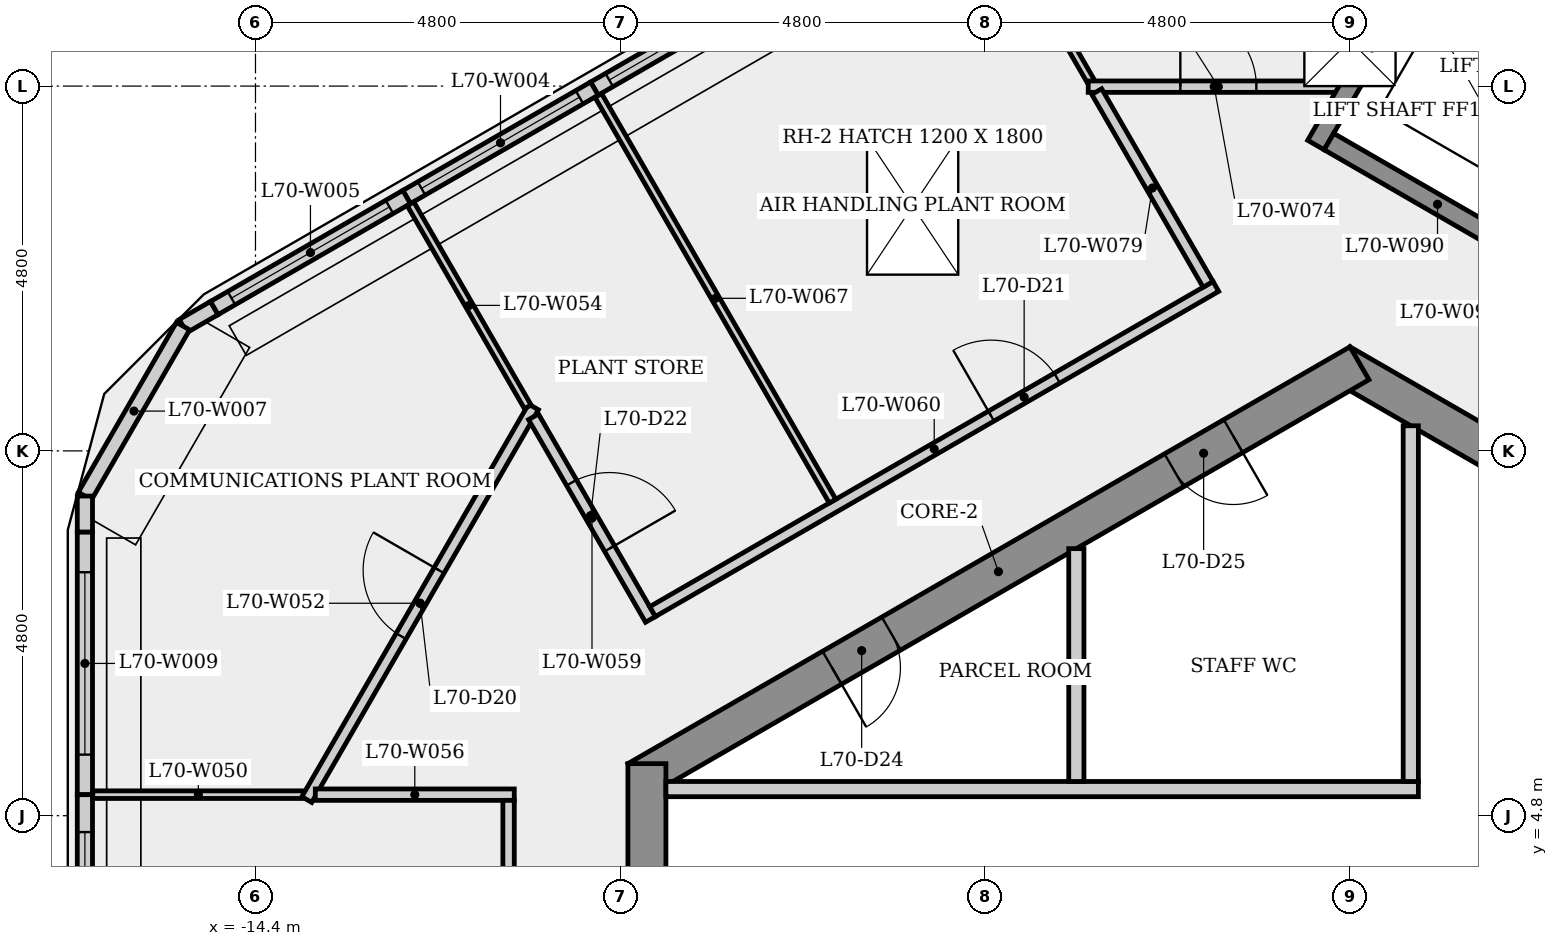
"""IFC4 building model, lengths in metres.
Left out: names, types, materials, properties, quantities, classifications, styles, units other than length and angle.
Written with IfcOpenShell. Run it as: python <this file> out.ifc"""

import sys

from ifc_helpers import new_model, si_unit, direction, frame, frame_2d, origin, origin_2d, place, context, subcontext, project, spatial, rectangle, extrude, element, fill, save


model = new_model("IFC4")
c1 = context("Model", 3, precision=1e-05, world=origin(), true_north=direction((0.0, 1.0)))
c2 = subcontext(c1, "Body", "Model", "MODEL_VIEW")
j1 = project(units=[si_unit("LENGTHUNIT", "METRE"), si_unit("PLANEANGLEUNIT", "RADIAN")], contexts=[c1])
p1 = place(None, origin())
s1 = spatial("IfcSite", under=j1, at=p1, CompositionType="ELEMENT")
p2 = place(p1, origin())
s2 = spatial("IfcBuilding", under=s1, at=p2, CompositionType="ELEMENT")
p3 = place(p2, frame((0.0, 0.0, 262.9)))
s3 = spatial("IfcBuildingStorey", under=s2, at=p3, CompositionType="ELEMENT", Elevation=262.9)
p4 = place(p3, frame((9.375, 5.268, 0.0), z_axis=(0.0, 0.0, 1.0), x_axis=(-0.866023993627, 0.500002442456, 0.0)))
e1 = element("IfcWall", 1, at=p4, inside=s3, PredefinedType="SHEAR", context=c2, shape_type="SweptSolid", body=[
    extrude(rectangle(XDim=10.97, YDim=0.5, at=frame_2d((5.485, 0.0))), origin(), (0.0, 0.0, 1.0), 4.8),
])
p5 = place(p4, frame((4.55, 0.0, 0.0)))
e2 = element("IfcOpeningElement", 2, at=p5, cuts=e1, PredefinedType="OPENING", context=c2, shape_type="SweptSolid", body=[
    extrude(rectangle(XDim=0.9, YDim=2.1, at=frame_2d((0.45, 1.05))), frame((0.0, 0.26, 0.0), z_axis=(0.0, -1.0, 0.0), x_axis=(1.0, 0.0, 0.0)), (0.0, 0.0, 1.0), 0.52),
])
p6 = place(p3, frame((0.125, 10.753, 0.0), z_axis=(0.0, 0.0, 1.0), x_axis=(-0.866023993627, -0.500002442456, 0.0)))
e3 = element("IfcWall", 3, at=p6, inside=s3, PredefinedType="SHEAR", context=c2, shape_type="SweptSolid", body=[
    extrude(rectangle(XDim=10.97, YDim=0.5, at=frame_2d((5.485, 0.0))), origin(), (0.0, 0.0, 1.0), 4.8),
])
p7 = place(p6, frame((7.113, 0.0, 0.0)))
e4 = element("IfcOpeningElement", 4, at=p7, cuts=e3, PredefinedType="OPENING", context=c2, shape_type="SweptSolid", body=[
    extrude(rectangle(XDim=0.9, YDim=2.1, at=frame_2d((0.45, 1.05))), frame((0.0, 0.26, 0.0), z_axis=(0.0, -1.0, 0.0), x_axis=(1.0, 0.0, 0.0)), (0.0, 0.0, 1.0), 0.52),
])
p8 = place(p6, frame((1.918, 0.0, 0.0)))
e5 = element("IfcOpeningElement", 5, at=p8, cuts=e3, PredefinedType="OPENING", context=c2, shape_type="SweptSolid", body=[
    extrude(rectangle(XDim=0.9, YDim=2.1, at=frame_2d((0.45, 1.05))), frame((0.0, 0.26, 0.0), z_axis=(0.0, -1.0, 0.0), x_axis=(1.0, 0.0, 0.0)), (0.0, 0.0, 1.0), 0.52),
])
p9 = place(p3, frame((-9.25, 5.485, 0.0), z_axis=(0.0, 0.0, 1.0), x_axis=(0.0, -1.0, 0.0)))
e6 = element("IfcWall", 6, at=p9, inside=s3, PredefinedType="SHEAR", context=c2, shape_type="SweptSolid", body=[
    extrude(rectangle(XDim=10.97, YDim=0.5, at=frame_2d((5.485, 0.0))), origin(), (0.0, 0.0, 1.0), 4.8),
])
p10 = place(p9, frame((8.509, 0.0, 0.0)))
e7 = element("IfcOpeningElement", 7, at=p10, cuts=e6, PredefinedType="OPENING", context=c2, shape_type="SweptSolid", body=[
    extrude(rectangle(XDim=0.9, YDim=2.1, at=frame_2d((0.45, 1.05))), frame((0.0, 0.26, 0.0), z_axis=(0.0, -1.0, 0.0), x_axis=(1.0, 0.0, 0.0)), (0.0, 0.0, 1.0), 0.52),
])
p11 = place(p9, frame((4.685, 0.0, 0.0)))
e8 = element("IfcOpeningElement", 8, at=p11, cuts=e6, PredefinedType="OPENING", context=c2, shape_type="SweptSolid", body=[
    extrude(rectangle(XDim=1.6, YDim=2.1, at=frame_2d((0.8, 1.05))), frame((0.0, 0.26, 0.0), z_axis=(0.0, -1.0, 0.0), x_axis=(1.0, 0.0, 0.0)), (0.0, 0.0, 1.0), 0.52),
])
p12 = place(p3, frame((-7.471, 15.793, 0.0), z_axis=(0.0, 0.0, 1.0), x_axis=(-0.8660059538, -0.500033686847, 0.0)))
e9 = element("IfcWall", 9, at=p12, inside=s3, PredefinedType="SOLIDWALL", context=c2, shape_type="SweptSolid", body=[
    extrude(rectangle(XDim=2.852, YDim=0.2, at=frame_2d((1.426, 0.0))), origin(), (0.0, 0.0, 1.0), 4.8),
])
p13 = place(p12, frame((0.226, 0.0, 0.8)))
e10 = element("IfcOpeningElement", 10, at=p13, cuts=e9, PredefinedType="OPENING", context=c2, shape_type="SweptSolid", body=[
    extrude(rectangle(XDim=2.4, YDim=2.4, at=frame_2d((1.2, 1.2))), frame((0.0, 0.11, 0.0), z_axis=(0.0, -1.0, 0.0), x_axis=(1.0, 0.0, 0.0)), (0.0, 0.0, 1.0), 0.22),
])
p14 = place(p3, frame((-9.941, 14.367, 0.0), z_axis=(0.0, 0.0, 1.0), x_axis=(-0.866038819146, -0.499976763192, 0.0)))
e11 = element("IfcWall", 11, at=p14, inside=s3, PredefinedType="SOLIDWALL", context=c2, shape_type="SweptSolid", body=[
    extrude(rectangle(XDim=2.853, YDim=0.2, at=frame_2d((1.427, 0.0))), origin(), (0.0, 0.0, 1.0), 4.8),
])
p15 = place(p14, frame((0.227, 0.0, 0.8)))
e12 = element("IfcOpeningElement", 12, at=p15, cuts=e11, PredefinedType="OPENING", context=c2, shape_type="SweptSolid", body=[
    extrude(rectangle(XDim=2.4, YDim=2.4, at=frame_2d((1.2, 1.2))), frame((0.0, 0.11, 0.0), z_axis=(0.0, -1.0, 0.0), x_axis=(1.0, 0.0, 0.0)), (0.0, 0.0, 1.0), 0.22),
])
p16 = place(p3, frame((-12.412, 12.94, 0.0), z_axis=(0.0, 0.0, 1.0), x_axis=(-0.866028329077, -0.499994933211, 0.0)))
e13 = element("IfcWall", 13, at=p16, inside=s3, PredefinedType="SOLIDWALL", context=c2, shape_type="SweptSolid", body=[
    extrude(rectangle(XDim=2.921, YDim=0.2, at=frame_2d((1.461, 0.0))), origin(), (0.0, 0.0, 1.0), 4.8),
])
p17 = place(p16, frame((0.261, 0.0, 0.8)))
e14 = element("IfcOpeningElement", 14, at=p17, cuts=e13, PredefinedType="OPENING", context=c2, shape_type="SweptSolid", body=[
    extrude(rectangle(XDim=2.4, YDim=2.4, at=frame_2d((1.2, 1.2))), frame((0.0, 0.11, 0.0), z_axis=(0.0, -1.0, 0.0), x_axis=(1.0, 0.0, 0.0)), (0.0, 0.0, 1.0), 0.22),
])
p18 = place(p3, frame((-14.942, 11.479, 0.0), z_axis=(0.0, 0.0, 1.0), x_axis=(-0.865988727248, -0.500063520245, 0.0)))
e15 = element("IfcWall", 15, at=p18, inside=s3, PredefinedType="SOLIDWALL", context=c2, shape_type="SweptSolid", body=[
    extrude(rectangle(XDim=0.475, YDim=0.2, at=frame_2d((0.238, 0.0))), origin(), (0.0, 0.0, 1.0), 4.8),
])
p19 = place(p3, frame((-15.353, 11.242, 0.0), z_axis=(0.0, 0.0, 1.0), x_axis=(-0.499992497538, -0.86602973529, 0.0)))
e16 = element("IfcWall", 16, at=p19, inside=s3, PredefinedType="SOLIDWALL", context=c2, shape_type="SweptSolid", body=[
    extrude(rectangle(XDim=2.583, YDim=0.2, at=frame_2d((1.291, 0.0))), origin(), (0.0, 0.0, 1.0), 4.8),
])
p20 = place(p3, frame((-16.645, 9.005, 0.0), z_axis=(0.0, 0.0, 1.0), x_axis=(0.0, -1.0, 0.0)))
e17 = element("IfcWall", 17, at=p20, inside=s3, PredefinedType="SOLIDWALL", context=c2, shape_type="SweptSolid", body=[
    extrude(rectangle(XDim=0.475, YDim=0.2, at=frame_2d((0.237, 0.0))), origin(), (0.0, 0.0, 1.0), 4.8),
])
p21 = place(p3, frame((-16.645, 8.531, 0.0), z_axis=(0.0, 0.0, 1.0), x_axis=(0.0, -1.0, 0.0)))
e18 = element("IfcWall", 18, at=p21, inside=s3, PredefinedType="SOLIDWALL", context=c2, shape_type="SweptSolid", body=[
    extrude(rectangle(XDim=3.454, YDim=0.2, at=frame_2d((1.727, 0.0))), origin(), (0.0, 0.0, 1.0), 4.8),
])
p22 = place(p21, frame((0.527, 0.0, 0.8)))
e19 = element("IfcOpeningElement", 19, at=p22, cuts=e18, PredefinedType="OPENING", context=c2, shape_type="SweptSolid", body=[
    extrude(rectangle(XDim=2.4, YDim=2.4, at=frame_2d((1.2, 1.2))), frame((0.0, 0.11, 0.0), z_axis=(0.0, -1.0, 0.0), x_axis=(1.0, 0.0, 0.0)), (0.0, 0.0, 1.0), 0.22),
])
p23 = place(p3, frame((-16.645, 5.076, 0.0), z_axis=(0.0, 0.0, 1.0), x_axis=(0.0, -1.0, 0.0)))
e20 = element("IfcWall", 20, at=p23, inside=s3, PredefinedType="SOLIDWALL", context=c2, shape_type="SweptSolid", body=[
    extrude(rectangle(XDim=3.384, YDim=0.2, at=frame_2d((1.692, 0.0))), origin(), (0.0, 0.0, 1.0), 4.8),
])
p24 = place(p23, frame((0.492, 0.0, 0.8)))
e21 = element("IfcOpeningElement", 21, at=p24, cuts=e20, PredefinedType="OPENING", context=c2, shape_type="SweptSolid", body=[
    extrude(rectangle(XDim=2.4, YDim=2.4, at=frame_2d((1.2, 1.2))), frame((0.0, 0.11, 0.0), z_axis=(0.0, -1.0, 0.0), x_axis=(1.0, 0.0, 0.0)), (0.0, 0.0, 1.0), 0.22),
])
p25 = place(p3, frame((-16.541, 5.077, 0.0), z_axis=(0.0, 0.0, 1.0), x_axis=(1.0, 0.0, 0.0)))
e22 = element("IfcWall", 22, at=p25, inside=s3, PredefinedType="PARTITIONING", context=c2, shape_type="SweptSolid", body=[
    extrude(rectangle(XDim=2.778, YDim=0.1, at=frame_2d((1.389, 0.0))), origin(), (0.0, 0.0, 1.0), 4.5),
])
p26 = place(p3, frame((-13.725, 5.012, 0.0), z_axis=(0.0, 0.0, 1.0), x_axis=(0.500016458012, 0.866015901539, 0.0)))
e23 = element("IfcWall", 23, at=p26, inside=s3, PredefinedType="PARTITIONING", context=c2, shape_type="SweptSolid", body=[
    extrude(rectangle(XDim=5.966, YDim=0.15, at=frame_2d((2.983, 0.0))), origin(), (0.0, 0.0, 1.0), 4.5),
])
p27 = place(p26, frame((2.483, 0.0, 0.0)))
e24 = element("IfcOpeningElement", 24, at=p27, cuts=e23, PredefinedType="OPENING", context=c2, shape_type="SweptSolid", body=[
    extrude(rectangle(XDim=1.0, YDim=2.1, at=frame_2d((0.5, 1.05))), frame((0.0, 0.085, 0.0), z_axis=(0.0, -1.0, 0.0), x_axis=(1.0, 0.0, 0.0)), (0.0, 0.0, 1.0), 0.17),
])
p28 = place(p3, frame((-12.36, 12.85, 0.0), z_axis=(0.0, 0.0, 1.0), x_axis=(0.499943966227, -0.866057752481, 0.0)))
e25 = element("IfcWall", 25, at=p28, inside=s3, PredefinedType="PARTITIONING", context=c2, shape_type="SweptSolid", body=[
    extrude(rectangle(XDim=3.085, YDim=0.1, at=frame_2d((1.542, 0.0))), origin(), (0.0, 0.0, 1.0), 4.5),
])
p29 = place(p3, frame((-10.995, 5.077, 0.0), z_axis=(0.0, 0.0, 1.0), x_axis=(-1.0, 0.0, 0.0)))
e26 = element("IfcWall", 26, at=p29, inside=s3, PredefinedType="PARTITIONING", context=c2, shape_type="SweptSolid", body=[
    extrude(rectangle(XDim=2.618, YDim=0.15, at=frame_2d((1.309, 0.0))), origin(), (0.0, 0.0, 1.0), 4.5),
])
p30 = place(p3, frame((-11.07, -5.002, 0.0), z_axis=(0.0, 0.0, 1.0), x_axis=(0.0, 1.0, 0.0)))
e27 = element("IfcWall", 27, at=p30, inside=s3, PredefinedType="PARTITIONING", context=c2, shape_type="SweptSolid", body=[
    extrude(rectangle(XDim=10.003, YDim=0.15, at=frame_2d((5.002, 0.0))), origin(), (0.0, 0.0, 1.0), 4.5),
])
p31 = place(p30, frame((6.172, 0.0, 0.0)))
e28 = element("IfcOpeningElement", 28, at=p31, cuts=e27, PredefinedType="OPENING", context=c2, shape_type="SweptSolid", body=[
    extrude(rectangle(XDim=1.0, YDim=2.1, at=frame_2d((0.5, 1.05))), frame((0.0, 0.085, 0.0), z_axis=(0.0, -1.0, 0.0), x_axis=(1.0, 0.0, 0.0)), (0.0, 0.0, 1.0), 0.17),
])
p32 = place(p3, frame((-10.742, 10.049, 0.0), z_axis=(0.0, 0.0, 1.0), x_axis=(0.49998558977, -0.866033723375, 0.0)))
e29 = element("IfcWall", 29, at=p32, inside=s3, PredefinedType="PARTITIONING", context=c2, shape_type="SweptSolid", body=[
    extrude(rectangle(XDim=3.079, YDim=0.15, at=frame_2d((1.539, 0.0))), origin(), (0.0, 0.0, 1.0), 4.5),
])
p33 = place(p32, frame((1.002, 0.0, 0.0)))
e30 = element("IfcOpeningElement", 30, at=p33, cuts=e29, PredefinedType="OPENING", context=c2, shape_type="SweptSolid", body=[
    extrude(rectangle(XDim=1.0, YDim=2.1, at=frame_2d((0.5, 1.05))), frame((0.0, 0.085, 0.0), z_axis=(0.0, -1.0, 0.0), x_axis=(1.0, 0.0, 0.0)), (0.0, 0.0, 1.0), 0.17),
])
p34 = place(p3, frame((-9.176, 7.485, 0.0), z_axis=(0.0, 0.0, 1.0), x_axis=(0.8660311782, 0.499989998285, 0.0)))
e31 = element("IfcWall", 31, at=p34, inside=s3, PredefinedType="PARTITIONING", context=c2, shape_type="SweptSolid", body=[
    extrude(rectangle(XDim=8.557, YDim=0.15, at=frame_2d((4.279, 0.0))), origin(), (0.0, 0.0, 1.0), 4.5),
])
p35 = place(p34, frame((5.145, 0.0, 0.0)))
e32 = element("IfcOpeningElement", 32, at=p35, cuts=e31, PredefinedType="OPENING", context=c2, shape_type="SweptSolid", body=[
    extrude(rectangle(XDim=1.0, YDim=2.1, at=frame_2d((0.5, 1.05))), frame((0.0, 0.085, 0.0), z_axis=(0.0, -1.0, 0.0), x_axis=(1.0, 0.0, 0.0)), (0.0, 0.0, 1.0), 0.17),
])
p36 = place(p3, frame((-6.808, 8.939, 0.0), z_axis=(0.0, 0.0, 1.0), x_axis=(-0.49999446594, 0.866028598852, 0.0)))
e33 = element("IfcWall", 33, at=p36, inside=s3, PredefinedType="PARTITIONING", context=c2, shape_type="SweptSolid", body=[
    extrude(rectangle(XDim=6.164, YDim=0.1, at=frame_2d((3.082, 0.0))), origin(), (0.0, 0.0, 1.0), 4.5),
])
p37 = place(p3, frame((-4.949, 17.129, 0.0), z_axis=(0.0, 0.0, 1.0), x_axis=(0.499943966227, -0.866057752481, 0.0)))
e34 = element("IfcWall", 34, at=p37, inside=s3, PredefinedType="PARTITIONING", context=c2, shape_type="SweptSolid", body=[
    extrude(rectangle(XDim=3.085, YDim=0.1, at=frame_2d((1.542, 0.0))), origin(), (0.0, 0.0, 1.0), 4.5),
])
p38 = place(p3, frame((-9.0, 5.15, 0.0), z_axis=(0.0, 0.0, 1.0), x_axis=(1.0, 0.0, 0.0)))
e35 = element("IfcWall", 35, at=p38, inside=s3, PredefinedType="PARTITIONING", context=c2, shape_type="SweptSolid", body=[
    extrude(rectangle(XDim=9.9, YDim=0.2, at=frame_2d((4.95, 0.0))), origin(), (0.0, 0.0, 1.0), 4.5),
])
p39 = place(p3, frame((-3.6, 8.314, 0.0), z_axis=(0.0, 0.0, 1.0), x_axis=(0.0, -1.0, 0.0)))
e36 = element("IfcWall", 36, at=p39, inside=s3, PredefinedType="PARTITIONING", context=c2, shape_type="SweptSolid", body=[
    extrude(rectangle(XDim=3.064, YDim=0.2, at=frame_2d((1.532, 0.0))), origin(), (0.0, 0.0, 1.0), 4.5),
])
p40 = place(p3, frame((-3.444, 14.393, 0.0), z_axis=(0.0, 0.0, 1.0), x_axis=(1.0, 0.0, 0.0)))
e37 = element("IfcWall", 37, at=p40, inside=s3, PredefinedType="PARTITIONING", context=c2, shape_type="SweptSolid", body=[
    extrude(rectangle(XDim=3.314, YDim=0.15, at=frame_2d((1.657, 0.0))), origin(), (0.0, 0.0, 1.0), 4.5),
])
p41 = place(p40, frame((1.212, 0.0, 0.0)))
e38 = element("IfcOpeningElement", 38, at=p41, cuts=e37, PredefinedType="OPENING", context=c2, shape_type="SweptSolid", body=[
    extrude(rectangle(XDim=1.0, YDim=2.1, at=frame_2d((0.5, 1.05))), frame((0.0, 0.085, 0.0), z_axis=(0.0, -1.0, 0.0), x_axis=(1.0, 0.0, 0.0)), (0.0, 0.0, 1.0), 0.17),
])
p42 = place(p3, frame((-1.867, 11.791, 0.0), z_axis=(0.0, 0.0, 1.0), x_axis=(-0.499967823365, 0.866043980176, 0.0)))
e39 = element("IfcWall", 39, at=p42, inside=s3, PredefinedType="PARTITIONING", context=c2, shape_type="SweptSolid", body=[
    extrude(rectangle(XDim=2.928, YDim=0.15, at=frame_2d((1.464, 0.0))), origin(), (0.0, 0.0, 1.0), 4.5),
])
p43 = place(p3, frame((-0.448, 13.624, 0.0), z_axis=(0.0, 0.0, 1.0), x_axis=(0.500037662692, 0.866003658127, 0.0)))
e40 = element("IfcWall", 40, at=p43, inside=s3, PredefinedType="SHEAR", context=c2, shape_type="SweptSolid", body=[
    extrude(rectangle(XDim=2.95, YDim=0.25, at=frame_2d((1.475, 0.0))), origin(), (0.0, 0.0, 1.0), 4.5),
])
p44 = place(p3, frame((0.8, 9.93, 0.0), z_axis=(0.0, 0.0, 1.0), x_axis=(0.0, -1.0, 0.0)))
e41 = element("IfcWall", 41, at=p44, inside=s3, PredefinedType="PARTITIONING", context=c2, shape_type="SweptSolid", body=[
    extrude(rectangle(XDim=4.68, YDim=0.2, at=frame_2d((2.34, 0.0))), origin(), (0.0, 0.0, 1.0), 4.5),
])
for number, where, z_axis, x_axis in (
    (42, (1.073, 16.008, 0.0), (0.0, 0.0, 1.0), (0.866, -0.5, 0.0)),
    (43, (2.581, 12.02, 0.0), (0.0, 0.0, 1.0), (-0.866, 0.5, 0.0)),
):
    element("IfcWall", number, at=place(p3, frame(where, z_axis=z_axis, x_axis=x_axis)), inside=s3, PredefinedType="SHEAR", context=c2, shape_type="SweptSolid", body=[
        extrude(rectangle(XDim=3.3, YDim=0.25, at=frame_2d((1.65, 0.0))), origin(), (0.0, 0.0, 1.0), 4.5),
    ])
p45 = place(p13, origin())
e44 = element("IfcWindow", 44, at=p45, inside=s3, PartitioningType="SINGLE_PANEL", PredefinedType="WINDOW", context=c2, shape_type="SweptSolid", body=[
    extrude(rectangle(XDim=2.4, YDim=2.4, at=frame_2d((1.2, 1.2))), frame((0.0, 0.03, 0.0), z_axis=(0.0, -1.0, 0.0), x_axis=(1.0, 0.0, 0.0)), (0.0, 0.0, 1.0), 0.06),
])
fill(e10, e44)
p46 = place(p15, origin())
e45 = element("IfcWindow", 45, at=p46, inside=s3, PartitioningType="SINGLE_PANEL", PredefinedType="WINDOW", context=c2, shape_type="SweptSolid", body=[
    extrude(rectangle(XDim=2.4, YDim=2.4, at=frame_2d((1.2, 1.2))), frame((0.0, 0.03, 0.0), z_axis=(0.0, -1.0, 0.0), x_axis=(1.0, 0.0, 0.0)), (0.0, 0.0, 1.0), 0.06),
])
fill(e12, e45)
p47 = place(p17, origin())
e46 = element("IfcWindow", 46, at=p47, inside=s3, PartitioningType="SINGLE_PANEL", PredefinedType="WINDOW", context=c2, shape_type="SweptSolid", body=[
    extrude(rectangle(XDim=2.4, YDim=2.4, at=frame_2d((1.2, 1.2))), frame((0.0, 0.03, 0.0), z_axis=(0.0, -1.0, 0.0), x_axis=(1.0, 0.0, 0.0)), (0.0, 0.0, 1.0), 0.06),
])
fill(e14, e46)
p48 = place(p22, origin())
e47 = element("IfcWindow", 47, at=p48, inside=s3, PartitioningType="SINGLE_PANEL", PredefinedType="WINDOW", context=c2, shape_type="SweptSolid", body=[
    extrude(rectangle(XDim=2.4, YDim=2.4, at=frame_2d((1.2, 1.2))), frame((0.0, 0.03, 0.0), z_axis=(0.0, -1.0, 0.0), x_axis=(1.0, 0.0, 0.0)), (0.0, 0.0, 1.0), 0.06),
])
fill(e19, e47)
p49 = place(p24, origin())
e48 = element("IfcWindow", 48, at=p49, inside=s3, PartitioningType="SINGLE_PANEL", PredefinedType="WINDOW", context=c2, shape_type="SweptSolid", body=[
    extrude(rectangle(XDim=2.4, YDim=2.4, at=frame_2d((1.2, 1.2))), frame((0.0, 0.03, 0.0), z_axis=(0.0, -1.0, 0.0), x_axis=(1.0, 0.0, 0.0)), (0.0, 0.0, 1.0), 0.06),
])
fill(e21, e48)
p50 = place(p2, frame((0.0, 0.0, 267.7)))
p51 = place(p50, origin())
p52 = place(p51, frame((0.0, 15.0, -0.01)))
p53 = place(p52, frame((0.0, 0.0, 0.26)))
e49 = element("IfcWindow", 49, at=p53, inside=s3, PartitioningType="SINGLE_PANEL", PredefinedType="SKYLIGHT", context=c2, shape_type="SweptSolid", body=[
    extrude(rectangle(XDim=1.2, YDim=1.2, at=origin_2d()), origin(), (0.0, 0.0, 1.0), 0.05),
])
p54 = place(p51, frame((-5.754, 12.819, -0.01)))
p55 = place(p54, frame((0.0, 0.0, 0.26)))
e50 = element("IfcWindow", 50, at=p55, inside=s3, PartitioningType="SINGLE_PANEL", PredefinedType="SKYLIGHT", context=c2, shape_type="SweptSolid", body=[
    extrude(rectangle(XDim=1.8, YDim=1.2, at=origin_2d()), origin(), (0.0, 0.0, 1.0), 0.05),
])
p56 = place(p27, origin())
e51 = element("IfcDoor", 51, at=p56, inside=s3, OperationType="SINGLE_SWING_RIGHT", PredefinedType="DOOR", context=c2, shape_type="SweptSolid", body=[
    extrude(rectangle(XDim=1.0, YDim=2.1, at=frame_2d((0.5, 1.05))), frame((0.0, 0.025, 0.0), z_axis=(0.0, -1.0, 0.0), x_axis=(1.0, 0.0, 0.0)), (0.0, 0.0, 1.0), 0.05),
])
fill(e24, e51)
p57 = place(p35, origin())
e52 = element("IfcDoor", 52, at=p57, inside=s3, OperationType="SINGLE_SWING_LEFT", PredefinedType="DOOR", context=c2, shape_type="SweptSolid", body=[
    extrude(rectangle(XDim=1.0, YDim=2.1, at=frame_2d((0.5, 1.05))), frame((0.0, 0.025, 0.0), z_axis=(0.0, -1.0, 0.0), x_axis=(1.0, 0.0, 0.0)), (0.0, 0.0, 1.0), 0.05),
])
fill(e32, e52)
p58 = place(p33, origin())
e53 = element("IfcDoor", 53, at=p58, inside=s3, OperationType="SINGLE_SWING_RIGHT", PredefinedType="DOOR", context=c2, shape_type="SweptSolid", body=[
    extrude(rectangle(XDim=1.0, YDim=2.1, at=frame_2d((0.5, 1.05))), frame((0.0, 0.025, 0.0), z_axis=(0.0, -1.0, 0.0), x_axis=(1.0, 0.0, 0.0)), (0.0, 0.0, 1.0), 0.05),
])
fill(e30, e53)
p59 = place(p41, origin())
e54 = element("IfcDoor", 54, at=p59, inside=s3, OperationType="SINGLE_SWING_LEFT", PredefinedType="DOOR", context=c2, shape_type="SweptSolid", body=[
    extrude(rectangle(XDim=1.0, YDim=2.1, at=frame_2d((0.5, 1.05))), frame((0.0, 0.025, 0.0), z_axis=(0.0, -1.0, 0.0), x_axis=(1.0, 0.0, 0.0)), (0.0, 0.0, 1.0), 0.05),
])
fill(e38, e54)
p60 = place(p7, origin())
e55 = element("IfcDoor", 55, at=p60, inside=s3, OperationType="SINGLE_SWING_RIGHT", PredefinedType="DOOR", context=c2, shape_type="SweptSolid", body=[
    extrude(rectangle(XDim=0.9, YDim=2.1, at=frame_2d((0.45, 1.05))), frame((0.0, 0.025, 0.0), z_axis=(0.0, -1.0, 0.0), x_axis=(1.0, 0.0, 0.0)), (0.0, 0.0, 1.0), 0.05),
])
fill(e4, e55)
p61 = place(p8, origin())
e56 = element("IfcDoor", 56, at=p61, inside=s3, OperationType="SINGLE_SWING_LEFT", PredefinedType="DOOR", context=c2, shape_type="SweptSolid", body=[
    extrude(rectangle(XDim=0.9, YDim=2.1, at=frame_2d((0.45, 1.05))), frame((0.0, 0.025, 0.0), z_axis=(0.0, -1.0, 0.0), x_axis=(1.0, 0.0, 0.0)), (0.0, 0.0, 1.0), 0.05),
])
fill(e5, e56)
save(model, sys.argv[1])
